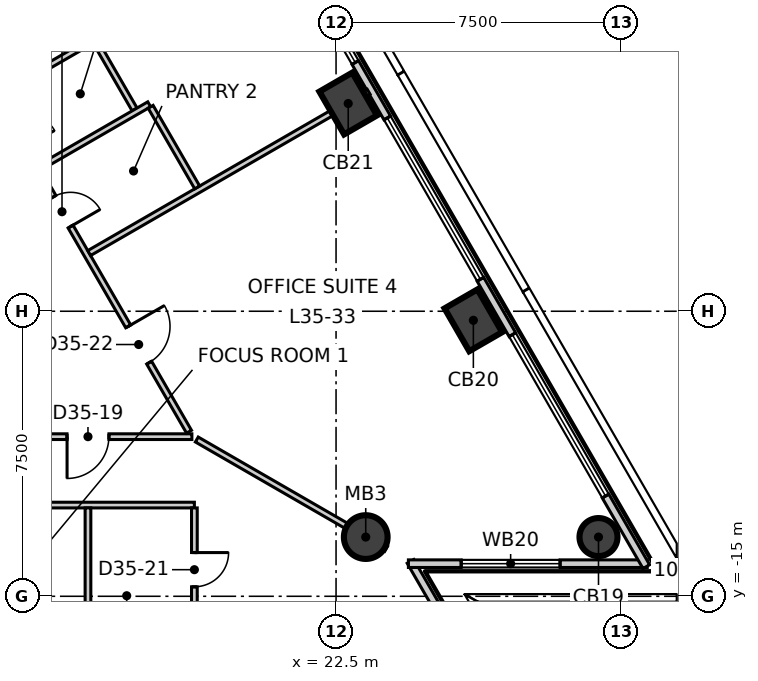
"""IFC4 building model, lengths in metres.
Left out: names, types, materials, properties, quantities, classifications, styles, units other than length and angle.
Written with IfcOpenShell. Run it as: python <this file> out.ifc"""

import sys

from ifc_helpers import new_model, si_unit, direction, frame, frame_2d, origin, origin_2d, place, context, subcontext, project, spatial, rectangle, circle, extrude, element, fill, save


model = new_model("IFC4")
c1 = context("Model", 3, precision=1e-05, world=origin(), true_north=direction((0.0, 1.0)))
c2 = subcontext(c1, "Body", "Model", "MODEL_VIEW")
j1 = project(units=[si_unit("LENGTHUNIT", "METRE"), si_unit("PLANEANGLEUNIT", "RADIAN")], contexts=[c1])
p1 = place(None, origin())
s1 = spatial("IfcSite", under=j1, at=p1, CompositionType="ELEMENT")
p2 = place(p1, origin())
s2 = spatial("IfcBuilding", under=s1, at=p2, CompositionType="ELEMENT")
p3 = place(p2, frame((0.0, 0.0, 152.3)))
s3 = spatial("IfcBuildingStorey", under=s2, at=p3, CompositionType="ELEMENT", Elevation=152.3)
p4 = place(p3, frame((29.406, -13.442, -0.3), z_axis=(0.0, 0.0, 1.0), x_axis=(-0.5, 0.866025403784, 0.0)))
e1 = element("IfcColumn", 1, at=p4, inside=s3, PredefinedType="COLUMN", context=c2, shape_type="SweptSolid", body=[
    extrude(circle(Radius=0.5, at=origin_2d()), origin(), (0.0, 0.0, 1.0), 4.0),
])
for number, where, z_axis, x_axis in (
    (2, (26.113, -7.738, -0.3), (0.0, 0.0, 1.0), (-0.5, 0.866, 0.0)),
    (3, (22.82, -2.034, -0.3), (0.0, 0.0, 1.0), (-0.5, 0.866, 0.0)),
):
    element("IfcColumn", number, at=place(p3, frame(where, z_axis=z_axis, x_axis=x_axis)), inside=s3, PredefinedType="COLUMN", context=c2, shape_type="SweptSolid", body=[
        extrude(rectangle(XDim=1.3, YDim=1.0, at=origin_2d()), origin(), (0.0, 0.0, 1.0), 4.0),
    ])
p5 = place(p3, frame((23.281, -13.442, -0.3), z_axis=(0.0, 0.0, 1.0), x_axis=(1.0, 0.0, 0.0)))
e4 = element("IfcColumn", 4, at=p5, inside=s3, PredefinedType="COLUMN", context=c2, shape_type="SweptSolid", body=[
    extrude(circle(Radius=0.575, at=origin_2d()), origin(), (0.0, 0.0, 1.0), 4.0),
])
p6 = place(p3, frame((27.602, -19.524, 0.0), z_axis=(0.0, 0.0, 1.0), x_axis=(-0.500074377092, 0.865982457891, 0.0)))
e5 = element("IfcWall", 5, at=p6, inside=s3, PredefinedType="ELEMENTEDWALL", context=c2, shape_type="SweptSolid", body=[
    extrude(rectangle(XDim=6.285, YDim=0.2, at=frame_2d((3.143, 0.0))), origin(), (0.0, 0.0, 1.0), 3.7),
])
p7 = place(p6, frame((1.99, 0.0, 0.9)))
e6 = element("IfcOpeningElement", 6, at=p7, cuts=e5, PredefinedType="OPENING", context=c2, shape_type="SweptSolid", body=[
    extrude(rectangle(XDim=2.6, YDim=2.5, at=frame_2d((1.3, 1.25))), frame((0.0, 0.11, 0.0), z_axis=(0.0, -1.0, 0.0), x_axis=(1.0, 0.0, 0.0)), (0.0, 0.0, 1.0), 0.22),
])
p8 = place(p3, frame((24.404, -14.142, 0.0), z_axis=(0.0, 0.0, 1.0), x_axis=(1.0, 0.0, 0.0)))
e7 = element("IfcWall", 7, at=p8, inside=s3, PredefinedType="ELEMENTEDWALL", context=c2, shape_type="SweptSolid", body=[
    extrude(rectangle(XDim=6.285, YDim=0.2, at=frame_2d((3.143, 0.0))), origin(), (0.0, 0.0, 1.0), 3.7),
])
p9 = place(p8, frame((1.39, 0.0, 0.9)))
e8 = element("IfcOpeningElement", 8, at=p9, cuts=e7, PredefinedType="OPENING", context=c2, shape_type="SweptSolid", body=[
    extrude(rectangle(XDim=2.6, YDim=2.5, at=frame_2d((1.3, 1.25))), frame((0.0, 0.11, 0.0), z_axis=(0.0, -1.0, 0.0), x_axis=(1.0, 0.0, 0.0)), (0.0, 0.0, 1.0), 0.22),
])
p10 = place(p3, frame((30.664, -14.22, 0.0), z_axis=(0.0, 0.0, 1.0), x_axis=(-0.499984613623, 0.866034286931, 0.0)))
e9 = element("IfcWall", 9, at=p10, inside=s3, PredefinedType="ELEMENTEDWALL", context=c2, shape_type="SweptSolid", body=[
    extrude(rectangle(XDim=55.274, YDim=0.2, at=frame_2d((27.637, 0.0))), origin(), (0.0, 0.0, 1.0), 3.7),
])
p11 = place(p10, frame((2.146, 0.0, 0.9)))
e10 = element("IfcOpeningElement", 10, at=p11, cuts=e9, PredefinedType="OPENING", context=c2, shape_type="SweptSolid", body=[
    extrude(rectangle(XDim=4.9, YDim=2.5, at=frame_2d((2.45, 1.25))), frame((0.0, 0.11, 0.0), z_axis=(0.0, -1.0, 0.0), x_axis=(1.0, 0.0, 0.0)), (0.0, 0.0, 1.0), 0.22),
])
p12 = place(p10, frame((8.732, 0.0, 0.9)))
e11 = element("IfcOpeningElement", 11, at=p12, cuts=e9, PredefinedType="OPENING", context=c2, shape_type="SweptSolid", body=[
    extrude(rectangle(XDim=4.9, YDim=2.5, at=frame_2d((2.45, 1.25))), frame((0.0, 0.11, 0.0), z_axis=(0.0, -1.0, 0.0), x_axis=(1.0, 0.0, 0.0)), (0.0, 0.0, 1.0), 0.22),
])
p13 = place(p10, frame((15.318, 0.0, 0.9)))
e12 = element("IfcOpeningElement", 12, at=p13, cuts=e9, PredefinedType="OPENING", context=c2, shape_type="SweptSolid", body=[
    extrude(rectangle(XDim=4.9, YDim=2.5, at=frame_2d((2.45, 1.25))), frame((0.0, 0.11, 0.0), z_axis=(0.0, -1.0, 0.0), x_axis=(1.0, 0.0, 0.0)), (0.0, 0.0, 1.0), 0.22),
])
p14 = place(p10, frame((21.904, 0.0, 0.9)))
e13 = element("IfcOpeningElement", 13, at=p14, cuts=e9, PredefinedType="OPENING", context=c2, shape_type="SweptSolid", body=[
    extrude(rectangle(XDim=4.9, YDim=2.5, at=frame_2d((2.45, 1.25))), frame((0.0, 0.11, 0.0), z_axis=(0.0, -1.0, 0.0), x_axis=(1.0, 0.0, 0.0)), (0.0, 0.0, 1.0), 0.22),
])
p15 = place(p10, frame((28.49, 0.0, 0.9)))
e14 = element("IfcOpeningElement", 14, at=p15, cuts=e9, PredefinedType="OPENING", context=c2, shape_type="SweptSolid", body=[
    extrude(rectangle(XDim=4.9, YDim=2.5, at=frame_2d((2.45, 1.25))), frame((0.0, 0.11, 0.0), z_axis=(0.0, -1.0, 0.0), x_axis=(1.0, 0.0, 0.0)), (0.0, 0.0, 1.0), 0.22),
])
p16 = place(p10, frame((35.076, 0.0, 0.9)))
e15 = element("IfcOpeningElement", 15, at=p16, cuts=e9, PredefinedType="OPENING", context=c2, shape_type="SweptSolid", body=[
    extrude(rectangle(XDim=4.9, YDim=2.5, at=frame_2d((2.45, 1.25))), frame((0.0, 0.11, 0.0), z_axis=(0.0, -1.0, 0.0), x_axis=(1.0, 0.0, 0.0)), (0.0, 0.0, 1.0), 0.22),
])
p17 = place(p10, frame((41.662, 0.0, 0.9)))
e16 = element("IfcOpeningElement", 16, at=p17, cuts=e9, PredefinedType="OPENING", context=c2, shape_type="SweptSolid", body=[
    extrude(rectangle(XDim=4.9, YDim=2.5, at=frame_2d((2.45, 1.25))), frame((0.0, 0.11, 0.0), z_axis=(0.0, -1.0, 0.0), x_axis=(1.0, 0.0, 0.0)), (0.0, 0.0, 1.0), 0.22),
])
p18 = place(p10, frame((48.248, 0.0, 0.9)))
e17 = element("IfcOpeningElement", 17, at=p18, cuts=e9, PredefinedType="OPENING", context=c2, shape_type="SweptSolid", body=[
    extrude(rectangle(XDim=4.9, YDim=2.5, at=frame_2d((2.45, 1.25))), frame((0.0, 0.11, 0.0), z_axis=(0.0, -1.0, 0.0), x_axis=(1.0, 0.0, 0.0)), (0.0, 0.0, 1.0), 0.22),
])
p19 = place(p3, frame((0.901, -10.8, 0.0), z_axis=(0.0, 0.0, 1.0), x_axis=(1.0, 0.0, 0.0)))
e18 = element("IfcWall", 18, at=p19, inside=s3, PredefinedType="PARTITIONING", context=c2, shape_type="SweptSolid", body=[
    extrude(rectangle(XDim=17.805, YDim=0.15, at=frame_2d((8.903, 0.0))), origin(), (0.0, 0.0, 1.0), 3.7),
])
p20 = place(p19, frame((9.949, 0.0, 0.0)))
e19 = element("IfcOpeningElement", 19, at=p20, cuts=e18, PredefinedType="OPENING", context=c2, shape_type="SweptSolid", body=[
    extrude(rectangle(XDim=1.1, YDim=2.1, at=frame_2d((0.55, 1.05))), frame((0.0, 0.085, 0.0), z_axis=(0.0, -1.0, 0.0), x_axis=(1.0, 0.0, 0.0)), (0.0, 0.0, 1.0), 0.17),
])
p21 = place(p19, frame((4.349, 0.0, 0.0)))
e20 = element("IfcOpeningElement", 20, at=p21, cuts=e18, PredefinedType="OPENING", context=c2, shape_type="SweptSolid", body=[
    extrude(rectangle(XDim=0.9, YDim=2.1, at=frame_2d((0.45, 1.05))), frame((0.0, 0.085, 0.0), z_axis=(0.0, -1.0, 0.0), x_axis=(1.0, 0.0, 0.0)), (0.0, 0.0, 1.0), 0.17),
])
p22 = place(p19, frame((7.049, 0.0, 0.0)))
e21 = element("IfcOpeningElement", 21, at=p22, cuts=e18, PredefinedType="OPENING", context=c2, shape_type="SweptSolid", body=[
    extrude(rectangle(XDim=1.0, YDim=2.1, at=frame_2d((0.5, 1.05))), frame((0.0, 0.085, 0.0), z_axis=(0.0, -1.0, 0.0), x_axis=(1.0, 0.0, 0.0)), (0.0, 0.0, 1.0), 0.17),
])
p23 = place(p19, frame((14.521, 0.0, 0.0)))
e22 = element("IfcOpeningElement", 22, at=p23, cuts=e18, PredefinedType="OPENING", context=c2, shape_type="SweptSolid", body=[
    extrude(rectangle(XDim=1.1, YDim=2.1, at=frame_2d((0.55, 1.05))), frame((0.0, 0.085, 0.0), z_axis=(0.0, -1.0, 0.0), x_axis=(1.0, 0.0, 0.0)), (0.0, 0.0, 1.0), 0.17),
])
p24 = place(p3, frame((18.836, -10.875, 0.0), z_axis=(0.0, 0.0, 1.0), x_axis=(0.86606191518, -0.499936755075, 0.0)))
e23 = element("IfcWall", 23, at=p24, inside=s3, PredefinedType="PARTITIONING", context=c2, shape_type="SweptSolid", body=[
    extrude(rectangle(XDim=5.753, YDim=0.15, at=frame_2d((2.876, 0.0))), origin(), (0.0, 0.0, 1.0), 3.2),
])
p25 = place(p3, frame((9.803, 4.62, 0.0), z_axis=(0.0, 0.0, 1.0), x_axis=(0.500017706633, -0.866015180614, 0.0)))
e24 = element("IfcWall", 24, at=p25, inside=s3, PredefinedType="PARTITIONING", context=c2, shape_type="SweptSolid", body=[
    extrude(rectangle(XDim=17.656, YDim=0.15, at=frame_2d((8.828, 0.0))), origin(), (0.0, 0.0, 1.0), 3.7),
])
p26 = place(p25, frame((14.456, 0.0, 0.0)))
e25 = element("IfcOpeningElement", 25, at=p26, cuts=e24, PredefinedType="OPENING", context=c2, shape_type="SweptSolid", body=[
    extrude(rectangle(XDim=1.1, YDim=2.1, at=frame_2d((0.55, 1.05))), frame((0.0, 0.085, 0.0), z_axis=(0.0, -1.0, 0.0), x_axis=(1.0, 0.0, 0.0)), (0.0, 0.0, 1.0), 0.17),
])
p27 = place(p25, frame((4.321, 0.0, 0.0)))
e26 = element("IfcOpeningElement", 26, at=p27, cuts=e24, PredefinedType="OPENING", context=c2, shape_type="SweptSolid", body=[
    extrude(rectangle(XDim=1.1, YDim=2.1, at=frame_2d((0.55, 1.05))), frame((0.0, 0.085, 0.0), z_axis=(0.0, -1.0, 0.0), x_axis=(1.0, 0.0, 0.0)), (0.0, 0.0, 1.0), 0.17),
])
p28 = place(p25, frame((10.521, 0.0, 0.0)))
e27 = element("IfcOpeningElement", 27, at=p28, cuts=e24, PredefinedType="OPENING", context=c2, shape_type="SweptSolid", body=[
    extrude(rectangle(XDim=0.9, YDim=2.1, at=frame_2d((0.45, 1.05))), frame((0.0, 0.085, 0.0), z_axis=(0.0, -1.0, 0.0), x_axis=(1.0, 0.0, 0.0)), (0.0, 0.0, 1.0), 0.17),
])
p29 = place(p25, frame((8.121, 0.0, 0.0)))
e28 = element("IfcOpeningElement", 28, at=p29, cuts=e24, PredefinedType="OPENING", context=c2, shape_type="SweptSolid", body=[
    extrude(rectangle(XDim=0.9, YDim=2.1, at=frame_2d((0.45, 1.05))), frame((0.0, 0.085, 0.0), z_axis=(0.0, -1.0, 0.0), x_axis=(1.0, 0.0, 0.0)), (0.0, 0.0, 1.0), 0.17),
])
p30 = place(p3, frame((16.137, -0.35, 0.0), z_axis=(0.0, 0.0, 1.0), x_axis=(0.499921421619, -0.866070766281, 0.0)))
e29 = element("IfcWall", 29, at=p30, inside=s3, PredefinedType="PARTITIONING", context=c2, shape_type="SweptSolid", body=[
    extrude(rectangle(XDim=2.124, YDim=0.15, at=frame_2d((1.062, 0.0))), origin(), (0.0, 0.0, 1.0), 3.7),
])
p31 = place(p3, frame((13.604, -1.812, 0.0), z_axis=(0.0, 0.0, 1.0), x_axis=(0.866004402611, 0.500036373335, 0.0)))
e30 = element("IfcWall", 30, at=p31, inside=s3, PredefinedType="PARTITIONING", context=c2, shape_type="SweptSolid", body=[
    extrude(rectangle(XDim=2.85, YDim=0.15, at=frame_2d((1.425, 0.0))), origin(), (0.0, 0.0, 1.0), 3.7),
])
p32 = place(p3, frame((14.704, -3.718, 0.0), z_axis=(0.0, 0.0, 1.0), x_axis=(0.865901827335, 0.500213979631, 0.0)))
e31 = element("IfcWall", 31, at=p32, inside=s3, PredefinedType="PARTITIONING", context=c2, shape_type="SweptSolid", body=[
    extrude(rectangle(XDim=3.325, YDim=0.15, at=frame_2d((1.662, 0.0))), origin(), (0.0, 0.0, 1.0), 3.7),
])
p33 = place(p3, frame((16.004, -5.969, 0.0), z_axis=(0.0, 0.0, 1.0), x_axis=(0.866045766046, 0.49996472987, 0.0)))
e32 = element("IfcWall", 32, at=p33, inside=s3, PredefinedType="PARTITIONING", context=c2, shape_type="SweptSolid", body=[
    extrude(rectangle(XDim=8.49, YDim=0.15, at=frame_2d((4.245, 0.0))), origin(), (0.0, 0.0, 1.0), 3.7),
])
p34 = place(p3, frame((17.621, -2.12, 0.0), z_axis=(0.0, 0.0, 1.0), x_axis=(0.499943856944, -0.866057815567, 0.0)))
e33 = element("IfcWall", 33, at=p34, inside=s3, PredefinedType="PARTITIONING", context=c2, shape_type="SweptSolid", body=[
    extrude(rectangle(XDim=2.45, YDim=0.15, at=frame_2d((1.225, 0.0))), origin(), (0.0, 0.0, 1.0), 3.7),
])
p35 = place(p3, frame((13.247, -12.6, 0.0), z_axis=(0.0, 0.0, 1.0), x_axis=(1.0, 0.0, 0.0)))
e34 = element("IfcWall", 34, at=p35, inside=s3, PredefinedType="PARTITIONING", context=c2, shape_type="SweptSolid", body=[
    extrude(rectangle(XDim=5.525, YDim=0.15, at=frame_2d((2.762, 0.0))), origin(), (0.0, 0.0, 1.0), 3.7),
])
p36 = place(p3, frame((18.772, -15.925, 0.0), z_axis=(0.0, 0.0, 1.0), x_axis=(0.0, 1.0, 0.0)))
e35 = element("IfcWall", 35, at=p36, inside=s3, PredefinedType="PARTITIONING", context=c2, shape_type="SweptSolid", body=[
    extrude(rectangle(XDim=3.25, YDim=0.15, at=frame_2d((1.625, 0.0))), origin(), (0.0, 0.0, 1.0), 3.7),
])
p37 = place(p36, frame((1.175, 0.0, 0.0)))
e36 = element("IfcOpeningElement", 36, at=p37, cuts=e35, PredefinedType="OPENING", context=c2, shape_type="SweptSolid", body=[
    extrude(rectangle(XDim=0.9, YDim=2.1, at=frame_2d((0.45, 1.05))), frame((0.0, 0.085, 0.0), z_axis=(0.0, -1.0, 0.0), x_axis=(1.0, 0.0, 0.0)), (0.0, 0.0, 1.0), 0.17),
])
p38 = place(p3, frame((15.972, -15.925, 0.0), z_axis=(0.0, 0.0, 1.0), x_axis=(0.0, 1.0, 0.0)))
e37 = element("IfcWall", 37, at=p38, inside=s3, PredefinedType="PARTITIONING", context=c2, shape_type="SweptSolid", body=[
    extrude(rectangle(XDim=3.25, YDim=0.15, at=frame_2d((1.625, 0.0))), origin(), (0.0, 0.0, 1.0), 3.7),
])
p39 = place(p9, origin())
e38 = element("IfcWindow", 38, at=p39, inside=s3, PartitioningType="SINGLE_PANEL", PredefinedType="WINDOW", context=c2, shape_type="SweptSolid", body=[
    extrude(rectangle(XDim=2.6, YDim=2.5, at=frame_2d((1.3, 1.25))), frame((0.0, 0.03, 0.0), z_axis=(0.0, -1.0, 0.0), x_axis=(1.0, 0.0, 0.0)), (0.0, 0.0, 1.0), 0.06),
])
fill(e8, e38)
p40 = place(p11, origin())
e39 = element("IfcWindow", 39, at=p40, inside=s3, PartitioningType="SINGLE_PANEL", PredefinedType="WINDOW", context=c2, shape_type="SweptSolid", body=[
    extrude(rectangle(XDim=4.9, YDim=2.5, at=frame_2d((2.45, 1.25))), frame((0.0, 0.03, 0.0), z_axis=(0.0, -1.0, 0.0), x_axis=(1.0, 0.0, 0.0)), (0.0, 0.0, 1.0), 0.06),
])
fill(e10, e39)
p41 = place(p12, origin())
e40 = element("IfcWindow", 40, at=p41, inside=s3, PartitioningType="SINGLE_PANEL", PredefinedType="WINDOW", context=c2, shape_type="SweptSolid", body=[
    extrude(rectangle(XDim=4.9, YDim=2.5, at=frame_2d((2.45, 1.25))), frame((0.0, 0.03, 0.0), z_axis=(0.0, -1.0, 0.0), x_axis=(1.0, 0.0, 0.0)), (0.0, 0.0, 1.0), 0.06),
])
fill(e11, e40)
p42 = place(p13, origin())
e41 = element("IfcWindow", 41, at=p42, inside=s3, PartitioningType="SINGLE_PANEL", PredefinedType="WINDOW", context=c2, shape_type="SweptSolid", body=[
    extrude(rectangle(XDim=4.9, YDim=2.5, at=frame_2d((2.45, 1.25))), frame((0.0, 0.03, 0.0), z_axis=(0.0, -1.0, 0.0), x_axis=(1.0, 0.0, 0.0)), (0.0, 0.0, 1.0), 0.06),
])
fill(e12, e41)
p43 = place(p23, origin())
e42 = element("IfcDoor", 42, at=p43, inside=s3, OperationType="SINGLE_SWING_LEFT", PredefinedType="DOOR", context=c2, shape_type="SweptSolid", body=[
    extrude(rectangle(XDim=1.1, YDim=2.1, at=frame_2d((0.55, 1.05))), frame((0.0, 0.025, 0.0), z_axis=(0.0, -1.0, 0.0), x_axis=(1.0, 0.0, 0.0)), (0.0, 0.0, 1.0), 0.05),
])
fill(e22, e42)
p44 = place(p37, origin())
e43 = element("IfcDoor", 43, at=p44, inside=s3, OperationType="SINGLE_SWING_RIGHT", PredefinedType="DOOR", context=c2, shape_type="SweptSolid", body=[
    extrude(rectangle(XDim=0.9, YDim=2.1, at=frame_2d((0.45, 1.05))), frame((0.0, 0.025, 0.0), z_axis=(0.0, -1.0, 0.0), x_axis=(1.0, 0.0, 0.0)), (0.0, 0.0, 1.0), 0.05),
])
fill(e36, e43)
p45 = place(p26, origin())
e44 = element("IfcDoor", 44, at=p45, inside=s3, OperationType="SINGLE_SWING_RIGHT", PredefinedType="DOOR", context=c2, shape_type="SweptSolid", body=[
    extrude(rectangle(XDim=1.1, YDim=2.1, at=frame_2d((0.55, 1.05))), frame((0.0, 0.025, 0.0), z_axis=(0.0, -1.0, 0.0), x_axis=(1.0, 0.0, 0.0)), (0.0, 0.0, 1.0), 0.05),
])
fill(e25, e44)
p46 = place(p28, origin())
e45 = element("IfcDoor", 45, at=p46, inside=s3, OperationType="SINGLE_SWING_LEFT", PredefinedType="DOOR", context=c2, shape_type="SweptSolid", body=[
    extrude(rectangle(XDim=0.9, YDim=2.1, at=frame_2d((0.45, 1.05))), frame((0.0, 0.025, 0.0), z_axis=(0.0, -1.0, 0.0), x_axis=(1.0, 0.0, 0.0)), (0.0, 0.0, 1.0), 0.05),
])
fill(e27, e45)
save(model, sys.argv[1])
